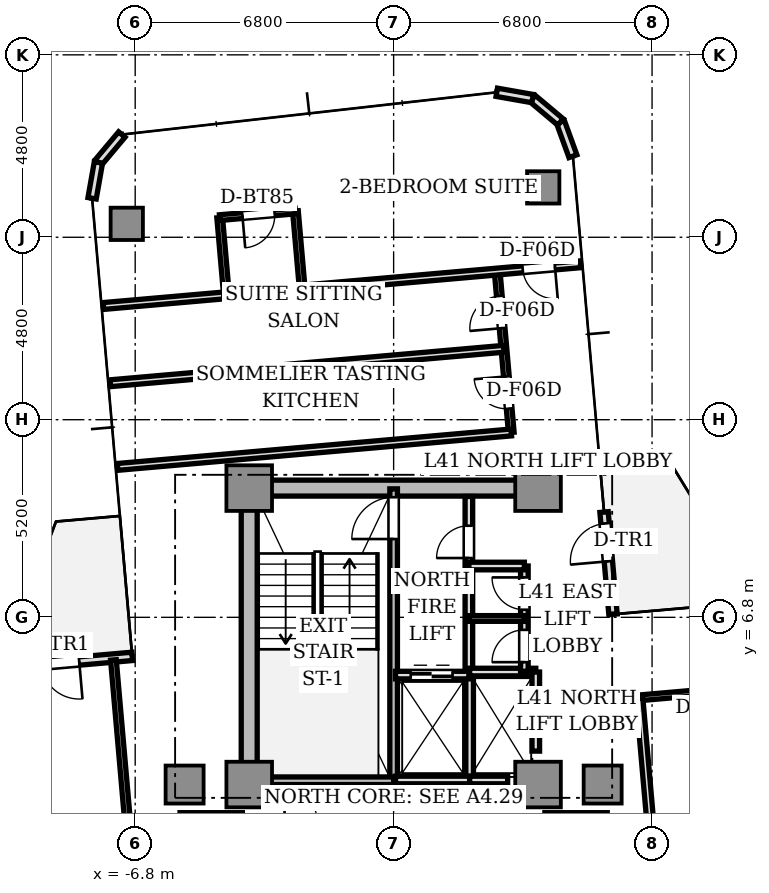
"""IFC4 building model, lengths in metres.
Left out: names, types, materials, properties, quantities, classifications, styles, units other than length and angle.
Written with IfcOpenShell. Run it as: python <this file> out.ifc"""

import sys

from ifc_helpers import new_model, si_unit, direction, frame, frame_2d, origin, origin_2d, place, context, subcontext, project, spatial, rectangle, extrude, source, transform, mapped, element, fill, save


model = new_model("IFC4")
c1 = context("Model", 3, precision=1e-05, world=origin(), true_north=direction((0.0, 1.0)))
c2 = subcontext(c1, "Body", "Model", "MODEL_VIEW")
j1 = project(units=[si_unit("LENGTHUNIT", "METRE"), si_unit("PLANEANGLEUNIT", "RADIAN")], contexts=[c1])
p1 = place(None, origin())
s1 = spatial("IfcSite", under=j1, at=p1, CompositionType="ELEMENT")
p2 = place(p1, origin())
s2 = spatial("IfcBuilding", under=s1, at=p2, CompositionType="ELEMENT")
p3 = place(p2, frame((0.0, 0.0, 150.6)))
s3 = spatial("IfcBuildingStorey", under=s2, at=p3, CompositionType="ELEMENT", Elevation=150.6)
p4 = place(p3, frame((-3.55, 10.2, 0.0), z_axis=(0.0, 0.0, 1.0), x_axis=(1.0, 0.0, 0.0)))
e1 = element("IfcWall", 1, at=p4, inside=s3, PredefinedType="SHEAR", context=c2, shape_type="SweptSolid", body=[
    extrude(rectangle(XDim=7.1, YDim=0.42, at=frame_2d((3.55, 0.0))), origin(), (0.0, 0.0, 1.0), 3.11),
])
p5 = place(p3, frame((-3.8, 2.85, 0.0), z_axis=(0.0, 0.0, 1.0), x_axis=(0.0, 1.0, 0.0)))
e2 = element("IfcWall", 2, at=p5, inside=s3, PredefinedType="SHEAR", context=c2, shape_type="SweptSolid", body=[
    extrude(rectangle(XDim=6.9, YDim=0.42, at=frame_2d((3.45, 0.0))), origin(), (0.0, 0.0, 1.0), 3.11),
])
m1 = source(origin(), c2, "Body", "SweptSolid", [
    extrude(rectangle(XDim=1.2, YDim=1.2, at=origin_2d()), origin(), (0.0, 0.0, 1.0), 3.11),
])
for number, where, z_axis, x_axis in (
    (3, (-3.8, 2.4, 0.0), (0.0, 0.0, 1.0), (1.0, 0.0, 0.0)),
    (4, (3.8, 2.4, 0.0), (0.0, 0.0, 1.0), (1.0, 0.0, 0.0)),
    (5, (-3.8, 10.2, 0.0), (0.0, 0.0, 1.0), (1.0, 0.0, 0.0)),
    (6, (3.8, 10.2, 0.0), (0.0, 0.0, 1.0), (1.0, 0.0, 0.0)),
):
    element("IfcColumn", number, at=place(p3, frame(where, z_axis=z_axis, x_axis=x_axis)), inside=s3, PredefinedType="COLUMN", context=c2, shape_type="MappedRepresentation", body=[
        mapped(m1, transform((0.0, 0.0, 0.0), scale=1.0)),
    ])
m2 = source(origin(), c2, "Body", "SweptSolid", [
    extrude(rectangle(XDim=1.0, YDim=1.0, at=origin_2d()), origin(), (0.0, 0.0, 1.0), 3.11),
])
for number, where, z_axis, x_axis in (
    (7, (5.5, 2.4, 0.0), (0.0, 0.0, 1.0), (1.0, 0.0, 0.0)),
    (8, (-5.5, 2.4, 0.0), (0.0, 0.0, 1.0), (1.0, 0.0, 0.0)),
):
    element("IfcColumn", number, at=place(p3, frame(where, z_axis=z_axis, x_axis=x_axis)), inside=s3, PredefinedType="COLUMN", context=c2, shape_type="MappedRepresentation", body=[
        mapped(m2, transform((0.0, 0.0, 0.0), scale=1.0)),
    ])
m3 = source(origin(), c2, "Body", "SweptSolid", [
    extrude(rectangle(XDim=0.85, YDim=0.85, at=origin_2d()), origin(), (0.0, 0.0, 1.0), 3.11),
])
for number, where, z_axis, x_axis in (
    (9, (3.936, 18.112, 0.0), (0.0, 0.0, 1.0), (1.0, 0.0, 0.0)),
    (10, (-7.022, 17.153, 0.0), (0.0, 0.0, 1.0), (1.0, 0.0, 0.0)),
):
    element("IfcColumn", number, at=place(p3, frame(where, z_axis=z_axis, x_axis=x_axis)), inside=s3, PredefinedType="COLUMN", context=c2, shape_type="MappedRepresentation", body=[
        mapped(m3, transform((0.0, 0.0, 0.0), scale=1.0)),
    ])
p6 = place(p3, frame((5.772, 6.879, 0.0), z_axis=(0.0, 0.0, 1.0), x_axis=(-0.087168071984, 0.996193619346, 0.0)))
e11 = element("IfcWall", 11, at=p6, inside=s3, PredefinedType="STANDARD", context=c2, shape_type="SweptSolid", body=[
    extrude(rectangle(XDim=2.7, YDim=0.22, at=frame_2d((1.35, 0.0))), origin(), (0.0, 0.0, 1.0), 3.11),
])
p7 = place(p6, frame((1.4, 0.0, 0.0)))
e12 = element("IfcOpeningElement", 12, at=p7, cuts=e11, PredefinedType="OPENING", context=c2, shape_type="SweptSolid", body=[
    extrude(rectangle(XDim=1.0, YDim=2.2, at=frame_2d((0.5, 1.1))), frame((0.0, 0.12, 0.0), z_axis=(0.0, -1.0, 0.0), x_axis=(1.0, 0.0, 0.0)), (0.0, 0.0, 1.0), 0.24),
])
p8 = place(p3, frame((4.718, 18.933, 0.0), z_axis=(0.0, 0.0, 1.0), x_axis=(-0.34188635151, 0.939741306239, 0.0)))
e13 = element("IfcWall", 13, at=p8, inside=s3, PredefinedType="STANDARD", context=c2, shape_type="SweptSolid", body=[
    extrude(rectangle(XDim=0.958, YDim=0.22, at=frame_2d((0.479, 0.0))), origin(), (0.0, 0.0, 1.0), 3.11),
])
for number, where, z_axis, x_axis in (
    (14, (4.39, 19.833, 0.0), (0.0, 0.0, 1.0), (-0.766, 0.643, 0.0)),
    (15, (3.657, 20.449, 0.0), (0.0, 0.0, 1.0), (-0.985, 0.174, 0.0)),
):
    element("IfcWall", number, at=place(p3, frame(where, z_axis=z_axis, x_axis=x_axis)), inside=s3, PredefinedType="STANDARD", context=c2, shape_type="SweptSolid", body=[
        extrude(rectangle(XDim=0.958, YDim=0.22, at=frame_2d((0.479, 0.0))), origin(), (0.0, 0.0, 1.0), 3.11),
    ])
for number, where, z_axis, x_axis in (
    (16, (-7.152, 19.503, 0.0), (0.0, 0.0, 1.0), (-0.643, -0.766, 0.0)),
    (17, (-7.768, 18.769, 0.0), (0.0, 0.0, 1.0), (-0.174, -0.985, 0.0)),
):
    element("IfcWall", number, at=place(p3, frame(where, z_axis=z_axis, x_axis=x_axis)), inside=s3, PredefinedType="STANDARD", context=c2, shape_type="SweptSolid", body=[
        extrude(rectangle(XDim=0.958, YDim=0.22, at=frame_2d((0.479, 0.0))), origin(), (0.0, 0.0, 1.0), 3.11),
    ])
p9 = place(p3, frame((-6.879, 5.772, 0.0), z_axis=(0.0, 0.0, 1.0), x_axis=(-0.996193619346, -0.087168071984, 0.0)))
e18 = element("IfcWall", 18, at=p9, inside=s3, PredefinedType="STANDARD", context=c2, shape_type="SweptSolid", body=[
    extrude(rectangle(XDim=2.7, YDim=0.22, at=frame_2d((1.35, 0.0))), origin(), (0.0, 0.0, 1.0), 3.11),
])
p10 = place(p9, frame((1.4, 0.0, 0.0)))
e19 = element("IfcOpeningElement", 19, at=p10, cuts=e18, PredefinedType="OPENING", context=c2, shape_type="SweptSolid", body=[
    extrude(rectangle(XDim=1.0, YDim=2.2, at=frame_2d((0.5, 1.1))), frame((0.0, 0.12, 0.0), z_axis=(0.0, -1.0, 0.0), x_axis=(1.0, 0.0, 0.0)), (0.0, 0.0, 1.0), 0.24),
])
p11 = place(p3, frame((0.0, 2.5, 0.0), z_axis=(0.0, 0.0, 1.0), x_axis=(0.0, 1.0, 0.0)))
e20 = element("IfcWall", 20, at=p11, inside=s3, PredefinedType="SOLIDWALL", context=c2, shape_type="SweptSolid", body=[
    extrude(rectangle(XDim=7.68, YDim=0.2, at=frame_2d((3.84, 0.0))), origin(), (0.0, 0.0, 1.0), 3.11),
])
p12 = place(p11, frame((6.36, 0.0, 0.0)))
e21 = element("IfcOpeningElement", 21, at=p12, cuts=e20, PredefinedType="OPENING", context=c2, shape_type="SweptSolid", body=[
    extrude(rectangle(XDim=1.1, YDim=2.15, at=frame_2d((0.55, 1.075))), frame((0.0, 0.11, 0.0), z_axis=(0.0, -1.0, 0.0), x_axis=(1.0, 0.0, 0.0)), (0.0, 0.0, 1.0), 0.22),
])
p13 = place(p3, frame((-3.72, 2.5, 0.0), z_axis=(0.0, 0.0, 1.0), x_axis=(1.0, 0.0, 0.0)))
e22 = element("IfcWall", 22, at=p13, inside=s3, PredefinedType="SOLIDWALL", context=c2, shape_type="SweptSolid", body=[
    extrude(rectangle(XDim=3.72, YDim=0.2, at=frame_2d((1.86, 0.0))), origin(), (0.0, 0.0, 1.0), 3.11),
])
p14 = place(p3, frame((1.98, 5.32, 0.0), z_axis=(0.0, 0.0, 1.0), x_axis=(0.0, 1.0, 0.0)))
e23 = element("IfcWall", 23, at=p14, inside=s3, PredefinedType="SOLIDWALL", context=c2, shape_type="SweptSolid", body=[
    extrude(rectangle(XDim=4.66, YDim=0.2, at=frame_2d((2.33, 0.0))), origin(), (0.0, 0.0, 1.0), 2.66),
])
p15 = place(p14, frame((3.04, 0.0, 0.0)))
e24 = element("IfcOpeningElement", 24, at=p15, cuts=e23, PredefinedType="OPENING", context=c2, shape_type="SweptSolid", body=[
    extrude(rectangle(XDim=0.85, YDim=2.1, at=frame_2d((0.425, 1.05))), frame((0.0, 0.11, 0.0), z_axis=(0.0, -1.0, 0.0), x_axis=(1.0, 0.0, 0.0)), (0.0, 0.0, 1.0), 0.22),
])
p16 = place(p3, frame((2.0, 2.5, 0.0), z_axis=(0.0, 0.0, 1.0), x_axis=(0.0, 1.0, 0.0)))
e25 = element("IfcWall", 25, at=p16, inside=s3, PredefinedType="SOLIDWALL", context=c2, shape_type="SweptSolid", body=[
    extrude(rectangle(XDim=2.78, YDim=0.2, at=frame_2d((1.39, 0.0))), origin(), (0.0, 0.0, 1.0), 2.66),
])
p17 = place(p3, frame((0.05, 2.52, 0.0), z_axis=(0.0, 0.0, 1.0), x_axis=(1.0, 0.0, 0.0)))
e26 = element("IfcWall", 26, at=p17, inside=s3, PredefinedType="SOLIDWALL", context=c2, shape_type="SweptSolid", body=[
    extrude(rectangle(XDim=1.95, YDim=0.2, at=frame_2d((0.975, 0.0))), origin(), (0.0, 0.0, 1.0), 2.66),
])
p18 = place(p3, frame((0.05, 5.28, 0.0), z_axis=(0.0, 0.0, 1.0), x_axis=(1.0, 0.0, 0.0)))
e27 = element("IfcWall", 27, at=p18, inside=s3, PredefinedType="SOLIDWALL", context=c2, shape_type="SweptSolid", body=[
    extrude(rectangle(XDim=1.93, YDim=0.2, at=frame_2d((0.965, 0.0))), origin(), (0.0, 0.0, 1.0), 2.66),
])
p19 = place(p18, frame((0.4, 0.0, 0.0)))
e28 = element("IfcOpeningElement", 28, at=p19, cuts=e27, PredefinedType="OPENING", context=c2, shape_type="SweptSolid", body=[
    extrude(rectangle(XDim=1.1, YDim=2.2, at=frame_2d((0.55, 1.1))), frame((0.0, 0.11, 0.0), z_axis=(0.0, -1.0, 0.0), x_axis=(1.0, 0.0, 0.0)), (0.0, 0.0, 1.0), 0.22),
])
p20 = place(p3, frame((2.0, 2.52, 0.0), z_axis=(0.0, 0.0, 1.0), x_axis=(1.0, 0.0, 0.0)))
e29 = element("IfcWall", 29, at=p20, inside=s3, PredefinedType="SOLIDWALL", context=c2, shape_type="SweptSolid", body=[
    extrude(rectangle(XDim=1.0, YDim=0.2, at=frame_2d((0.5, 0.0))), origin(), (0.0, 0.0, 1.0), 2.66),
])
p21 = place(p3, frame((2.0, 5.36, 0.0), z_axis=(0.0, 0.0, 1.0), x_axis=(1.0, 0.0, 0.0)))
e30 = element("IfcWall", 30, at=p21, inside=s3, PredefinedType="SOLIDWALL", context=c2, shape_type="SweptSolid", body=[
    extrude(rectangle(XDim=1.74, YDim=0.2, at=frame_2d((0.87, 0.0))), origin(), (0.0, 0.0, 1.0), 2.66),
])
p22 = place(p3, frame((3.74, 3.28, 0.0), z_axis=(0.0, 0.0, 1.0), x_axis=(0.0, 1.0, 0.0)))
e31 = element("IfcWall", 31, at=p22, inside=s3, PredefinedType="SOLIDWALL", context=c2, shape_type="SweptSolid", body=[
    extrude(rectangle(XDim=2.08, YDim=0.2, at=frame_2d((1.04, 0.0))), origin(), (0.0, 0.0, 1.0), 2.66),
])
p23 = place(p22, frame((0.44, 0.0, 0.0)))
e32 = element("IfcOpeningElement", 32, at=p23, cuts=e31, PredefinedType="OPENING", context=c2, shape_type="SweptSolid", body=[
    extrude(rectangle(XDim=1.2, YDim=2.2, at=frame_2d((0.6, 1.1))), frame((0.0, 0.11, 0.0), z_axis=(0.0, -1.0, 0.0), x_axis=(1.0, 0.0, 0.0)), (0.0, 0.0, 1.0), 0.22),
])
for number, where, z_axis, x_axis in (
    (33, (3.98, 1.56, 0.0), (0.0, 0.0, 1.0), (1.0, 0.0, 0.0)),
    (34, (-5.62, 1.56, 0.0), (0.0, 0.0, 1.0), (1.0, 0.0, 0.0)),
):
    element("IfcWall", number, at=place(p3, frame(where, z_axis=z_axis, x_axis=x_axis)), inside=s3, PredefinedType="SOLIDWALL", context=c2, shape_type="SweptSolid", body=[
        extrude(rectangle(XDim=1.64, YDim=0.2, at=frame_2d((0.82, 0.0))), origin(), (0.0, 0.0, 1.0), 2.66),
    ])
p24 = place(p3, frame((3.44, 5.38, 0.0), z_axis=(0.0, 0.0, 1.0), x_axis=(0.0, 1.0, 0.0)))
e35 = element("IfcWall", 35, at=p24, inside=s3, PredefinedType="SOLIDWALL", context=c2, shape_type="SweptSolid", body=[
    extrude(rectangle(XDim=2.77, YDim=0.2, at=frame_2d((1.385, 0.0))), origin(), (0.0, 0.0, 1.0), 2.66),
])
p25 = place(p24, frame((0.24, 0.0, 0.0)))
e36 = element("IfcOpeningElement", 36, at=p25, cuts=e35, PredefinedType="OPENING", context=c2, shape_type="SweptSolid", body=[
    extrude(rectangle(XDim=0.85, YDim=2.1, at=frame_2d((0.425, 1.05))), frame((0.0, 0.11, 0.0), z_axis=(0.0, -1.0, 0.0), x_axis=(1.0, 0.0, 0.0)), (0.0, 0.0, 1.0), 0.22),
])
p26 = place(p24, frame((1.62, 0.0, 0.0)))
e37 = element("IfcOpeningElement", 37, at=p26, cuts=e35, PredefinedType="OPENING", context=c2, shape_type="SweptSolid", body=[
    extrude(rectangle(XDim=0.85, YDim=2.1, at=frame_2d((0.425, 1.05))), frame((0.0, 0.11, 0.0), z_axis=(0.0, -1.0, 0.0), x_axis=(1.0, 0.0, 0.0)), (0.0, 0.0, 1.0), 0.22),
])
p27 = place(p3, frame((1.98, 8.15, 0.0), z_axis=(0.0, 0.0, 1.0), x_axis=(1.0, 0.0, 0.0)))
e38 = element("IfcWall", 38, at=p27, inside=s3, PredefinedType="SOLIDWALL", context=c2, shape_type="SweptSolid", body=[
    extrude(rectangle(XDim=1.46, YDim=0.2, at=frame_2d((0.73, 0.0))), origin(), (0.0, 0.0, 1.0), 2.66),
])
p28 = place(p3, frame((1.98, 6.77, 0.0), z_axis=(0.0, 0.0, 1.0), x_axis=(1.0, 0.0, 0.0)))
e39 = element("IfcWall", 39, at=p28, inside=s3, PredefinedType="PARTITIONING", context=c2, shape_type="SweptSolid", body=[
    extrude(rectangle(XDim=1.46, YDim=0.15, at=frame_2d((0.73, 0.0))), origin(), (0.0, 0.0, 1.0), 2.66),
])
p29 = place(p3, frame((6.467, 4.681, 0.0), z_axis=(0.0, 0.0, 1.0), x_axis=(0.996195452949, 0.087147114263, 0.0)))
e40 = element("IfcWall", 40, at=p29, inside=s3, PredefinedType="PARTITIONING", context=c2, shape_type="SweptSolid", body=[
    extrude(rectangle(XDim=8.55, YDim=0.15, at=frame_2d((4.275, 0.0))), origin(), (0.0, 0.0, 1.0), 2.66),
])
p30 = place(p29, frame((1.491, 0.0, 0.0)))
e41 = element("IfcOpeningElement", 41, at=p30, cuts=e40, PredefinedType="OPENING", context=c2, shape_type="SweptSolid", body=[
    extrude(rectangle(XDim=0.85, YDim=2.1, at=frame_2d((0.425, 1.05))), frame((0.0, 0.085, 0.0), z_axis=(0.0, -1.0, 0.0), x_axis=(1.0, 0.0, 0.0)), (0.0, 0.0, 1.0), 0.17),
])
p31 = place(p29, frame((4.792, 0.0, 0.0)))
e42 = element("IfcOpeningElement", 42, at=p31, cuts=e40, PredefinedType="OPENING", context=c2, shape_type="SweptSolid", body=[
    extrude(rectangle(XDim=0.85, YDim=2.1, at=frame_2d((0.425, 1.05))), frame((0.0, 0.085, 0.0), z_axis=(0.0, -1.0, 0.0), x_axis=(1.0, 0.0, 0.0)), (0.0, 0.0, 1.0), 0.17),
])
p32 = place(p3, frame((7.373, -5.679, 0.0), z_axis=(0.0, 0.0, 1.0), x_axis=(-0.087163455754, 0.996194023261, 0.0)))
e43 = element("IfcWall", 43, at=p32, inside=s3, PredefinedType="PARTITIONING", context=c2, shape_type="SweptSolid", body=[
    extrude(rectangle(XDim=10.4, YDim=0.18, at=frame_2d((5.2, 0.0))), origin(), (0.0, 0.0, 1.0), 2.66),
])
p33 = place(p3, frame((3.095, 11.664, 0.0), z_axis=(0.0, 0.0, 1.0), x_axis=(-0.087142722004, 0.996195837173, 0.0)))
e44 = element("IfcWall", 44, at=p33, inside=s3, PredefinedType="PARTITIONING", context=c2, shape_type="SweptSolid", body=[
    extrude(rectangle(XDim=4.25, YDim=0.15, at=frame_2d((2.125, 0.0))), origin(), (0.0, 0.0, 1.0), 2.66),
])
p34 = place(p33, frame((0.63, 0.0, 0.0)))
e45 = element("IfcOpeningElement", 45, at=p34, cuts=e44, PredefinedType="OPENING", context=c2, shape_type="SweptSolid", body=[
    extrude(rectangle(XDim=0.85, YDim=2.1, at=frame_2d((0.425, 1.05))), frame((0.0, 0.085, 0.0), z_axis=(0.0, -1.0, 0.0), x_axis=(1.0, 0.0, 0.0)), (0.0, 0.0, 1.0), 0.17),
])
p35 = place(p33, frame((2.755, 0.0, 0.0)))
e46 = element("IfcOpeningElement", 46, at=p35, cuts=e44, PredefinedType="OPENING", context=c2, shape_type="SweptSolid", body=[
    extrude(rectangle(XDim=0.85, YDim=2.1, at=frame_2d((0.425, 1.05))), frame((0.0, 0.085, 0.0), z_axis=(0.0, -1.0, 0.0), x_axis=(1.0, 0.0, 0.0)), (0.0, 0.0, 1.0), 0.17),
])
p36 = place(p3, frame((3.095, 11.664, 0.0), z_axis=(0.0, 0.0, 1.0), x_axis=(-0.996196061386, -0.087140158824, 0.0)))
e47 = element("IfcWall", 47, at=p36, inside=s3, PredefinedType="PARTITIONING", context=c2, shape_type="SweptSolid", body=[
    extrude(rectangle(XDim=10.4, YDim=0.18, at=frame_2d((5.2, 0.0))), origin(), (0.0, 0.0, 1.0), 2.66),
])
p37 = place(p3, frame((2.903, 13.866, 0.0), z_axis=(0.0, 0.0, 1.0), x_axis=(-0.996194201607, -0.087161417409, 0.0)))
e48 = element("IfcWall", 48, at=p37, inside=s3, PredefinedType="PARTITIONING", context=c2, shape_type="SweptSolid", body=[
    extrude(rectangle(XDim=10.4, YDim=0.18, at=frame_2d((5.2, 0.0))), origin(), (0.0, 0.0, 1.0), 2.66),
])
p38 = place(p3, frame((4.917, 16.09, 0.0), z_axis=(0.0, 0.0, 1.0), x_axis=(-0.996196619285, -0.087133780622, 0.0)))
e49 = element("IfcWall", 49, at=p38, inside=s3, PredefinedType="PARTITIONING", context=c2, shape_type="SweptSolid", body=[
    extrude(rectangle(XDim=12.6, YDim=0.18, at=frame_2d((6.3, 0.0))), origin(), (0.0, 0.0, 1.0), 2.66),
])
p39 = place(p38, frame((0.675, 0.0, 0.0)))
e50 = element("IfcOpeningElement", 50, at=p39, cuts=e49, PredefinedType="OPENING", context=c2, shape_type="SweptSolid", body=[
    extrude(rectangle(XDim=0.85, YDim=2.1, at=frame_2d((0.425, 1.05))), frame((0.0, 0.1, 0.0), z_axis=(0.0, -1.0, 0.0), x_axis=(1.0, 0.0, 0.0)), (0.0, 0.0, 1.0), 0.2),
])
for number, where, z_axis, x_axis in (
    (51, (-4.398, 15.275, 0.0), (0.0, 0.0, 1.0), (-0.087, 0.996, 0.0)),
    (52, (-2.406, 15.449, 0.0), (0.0, 0.0, 1.0), (-0.087, 0.996, 0.0)),
):
    element("IfcWall", number, at=place(p3, frame(where, z_axis=z_axis, x_axis=x_axis)), inside=s3, PredefinedType="PARTITIONING", context=c2, shape_type="SweptSolid", body=[
        extrude(rectangle(XDim=2.05, YDim=0.15, at=frame_2d((1.025, 0.0))), origin(), (0.0, 0.0, 1.0), 2.66),
    ])
p40 = place(p3, frame((-2.584, 17.491, 0.0), z_axis=(0.0, 0.0, 1.0), x_axis=(-0.99619464492, -0.087156350505, 0.0)))
e53 = element("IfcWall", 53, at=p40, inside=s3, PredefinedType="PARTITIONING", context=c2, shape_type="SweptSolid", body=[
    extrude(rectangle(XDim=2.0, YDim=0.15, at=frame_2d((1.0, 0.0))), origin(), (0.0, 0.0, 1.0), 2.63),
])
p41 = place(p40, frame((0.55, 0.0, 0.0)))
e54 = element("IfcOpeningElement", 54, at=p41, cuts=e53, PredefinedType="OPENING", context=c2, shape_type="SweptSolid", body=[
    extrude(rectangle(XDim=0.85, YDim=2.1, at=frame_2d((0.425, 1.05))), frame((0.0, 0.085, 0.0), z_axis=(0.0, -1.0, 0.0), x_axis=(1.0, 0.0, 0.0)), (0.0, 0.0, 1.0), 0.17),
])
p42 = place(p3, frame((-7.373, 5.679, 0.0), z_axis=(0.0, 0.0, 1.0), x_axis=(0.087154691724, -0.996194790044, 0.0)))
e55 = element("IfcWall", 55, at=p42, inside=s3, PredefinedType="PARTITIONING", context=c2, shape_type="SweptSolid", body=[
    extrude(rectangle(XDim=12.6, YDim=0.15, at=frame_2d((6.3, 0.0))), origin(), (0.0, 0.0, 1.0), 2.66),
])
p43 = place(p42, frame((5.5, 0.0, 0.0)))
e56 = element("IfcOpeningElement", 56, at=p43, cuts=e55, PredefinedType="OPENING", context=c2, shape_type="SweptSolid", body=[
    extrude(rectangle(XDim=1.6, YDim=2.25, at=frame_2d((0.8, 1.125))), frame((0.0, 0.085, 0.0), z_axis=(0.0, -1.0, 0.0), x_axis=(1.0, 0.0, 0.0)), (0.0, 0.0, 1.0), 0.17),
])
m4 = source(origin(), c2, "Body", "SweptSolid", [
    extrude(rectangle(XDim=1.0, YDim=0.05, at=origin_2d()), origin(), (0.0, 0.0, 1.0), 2.2),
])
p44 = place(p7, frame((0.5, 0.0, 0.0)))
e57 = element("IfcDoor", 57, at=p44, inside=s3, OperationType="SINGLE_SWING_LEFT", PredefinedType="DOOR", context=c2, shape_type="MappedRepresentation", body=[
    mapped(m4, transform((0.0, 0.0, 0.0), scale=1.0)),
])
fill(e12, e57)
p45 = place(p10, frame((0.5, 0.0, 0.0)))
e58 = element("IfcDoor", 58, at=p45, inside=s3, OperationType="SINGLE_SWING_LEFT", PredefinedType="DOOR", context=c2, shape_type="MappedRepresentation", body=[
    mapped(m4, transform((0.0, 0.0, 0.0), scale=1.0)),
])
fill(e19, e58)
m5 = source(origin(), c2, "Body", "SweptSolid", [
    extrude(rectangle(XDim=1.1, YDim=0.05, at=origin_2d()), origin(), (0.0, 0.0, 1.0), 2.15),
])
p46 = place(p12, frame((0.55, 0.0, 0.0)))
e59 = element("IfcDoor", 59, at=p46, inside=s3, OperationType="SINGLE_SWING_LEFT", PredefinedType="DOOR", context=c2, shape_type="MappedRepresentation", body=[
    mapped(m5, transform((0.0, 0.0, 0.0), scale=1.0)),
])
fill(e21, e59)
m6 = source(origin(), c2, "Body", "SweptSolid", [
    extrude(rectangle(XDim=0.85, YDim=0.05, at=origin_2d()), origin(), (0.0, 0.0, 1.0), 2.1),
])
p47 = place(p15, frame((0.425, 0.0, 0.0)))
e60 = element("IfcDoor", 60, at=p47, inside=s3, OperationType="SINGLE_SWING_LEFT", PredefinedType="DOOR", context=c2, shape_type="MappedRepresentation", body=[
    mapped(m6, transform((0.0, 0.0, 0.0), scale=1.0)),
])
fill(e24, e60)
m7 = source(origin(), c2, "Body", "SweptSolid", [
    extrude(rectangle(XDim=1.1, YDim=0.05, at=origin_2d()), origin(), (0.0, 0.0, 1.0), 2.2),
])
p48 = place(p19, frame((0.55, 0.0, 0.0)))
e61 = element("IfcDoor", 61, at=p48, inside=s3, OperationType="DOUBLE_DOOR_SLIDING", PredefinedType="DOOR", context=c2, shape_type="MappedRepresentation", body=[
    mapped(m7, transform((0.0, 0.0, 0.0), scale=1.0)),
])
fill(e28, e61)
m8 = source(origin(), c2, "Body", "SweptSolid", [
    extrude(rectangle(XDim=1.2, YDim=0.05, at=origin_2d()), origin(), (0.0, 0.0, 1.0), 2.2),
])
p49 = place(p23, frame((0.6, 0.0, 0.0)))
e62 = element("IfcDoor", 62, at=p49, inside=s3, OperationType="DOUBLE_DOOR_SLIDING", PredefinedType="DOOR", context=c2, shape_type="MappedRepresentation", body=[
    mapped(m8, transform((0.0, 0.0, 0.0), scale=1.0)),
])
fill(e32, e62)
p50 = place(p25, frame((0.425, 0.0, 0.0)))
e63 = element("IfcDoor", 63, at=p50, inside=s3, OperationType="SINGLE_SWING_LEFT", PredefinedType="DOOR", context=c2, shape_type="MappedRepresentation", body=[
    mapped(m6, transform((0.0, 0.0, 0.0), scale=1.0)),
])
fill(e36, e63)
p51 = place(p26, frame((0.425, 0.0, 0.0)))
e64 = element("IfcDoor", 64, at=p51, inside=s3, OperationType="SINGLE_SWING_RIGHT", PredefinedType="DOOR", context=c2, shape_type="MappedRepresentation", body=[
    mapped(m6, transform((0.0, 0.0, 0.0), scale=1.0)),
])
fill(e37, e64)
p52 = place(p34, frame((0.425, 0.0, 0.0)))
e65 = element("IfcDoor", 65, at=p52, inside=s3, OperationType="SINGLE_SWING_RIGHT", PredefinedType="DOOR", context=c2, shape_type="MappedRepresentation", body=[
    mapped(m6, transform((0.0, 0.0, 0.0), scale=1.0)),
])
fill(e45, e65)
p53 = place(p35, frame((0.425, 0.0, 0.0)))
e66 = element("IfcDoor", 66, at=p53, inside=s3, OperationType="SINGLE_SWING_LEFT", PredefinedType="DOOR", context=c2, shape_type="MappedRepresentation", body=[
    mapped(m6, transform((0.0, 0.0, 0.0), scale=1.0)),
])
fill(e46, e66)
p54 = place(p41, frame((0.425, 0.0, 0.0)))
e67 = element("IfcDoor", 67, at=p54, inside=s3, OperationType="SINGLE_SWING_RIGHT", PredefinedType="DOOR", context=c2, shape_type="MappedRepresentation", body=[
    mapped(m6, transform((0.0, 0.0, 0.0), scale=1.0)),
])
fill(e54, e67)
p55 = place(p39, frame((0.425, 0.0, 0.0)))
e68 = element("IfcDoor", 68, at=p55, inside=s3, OperationType="SINGLE_SWING_LEFT", PredefinedType="DOOR", context=c2, shape_type="MappedRepresentation", body=[
    mapped(m6, transform((0.0, 0.0, 0.0), scale=1.0)),
])
fill(e50, e68)
save(model, sys.argv[1])
